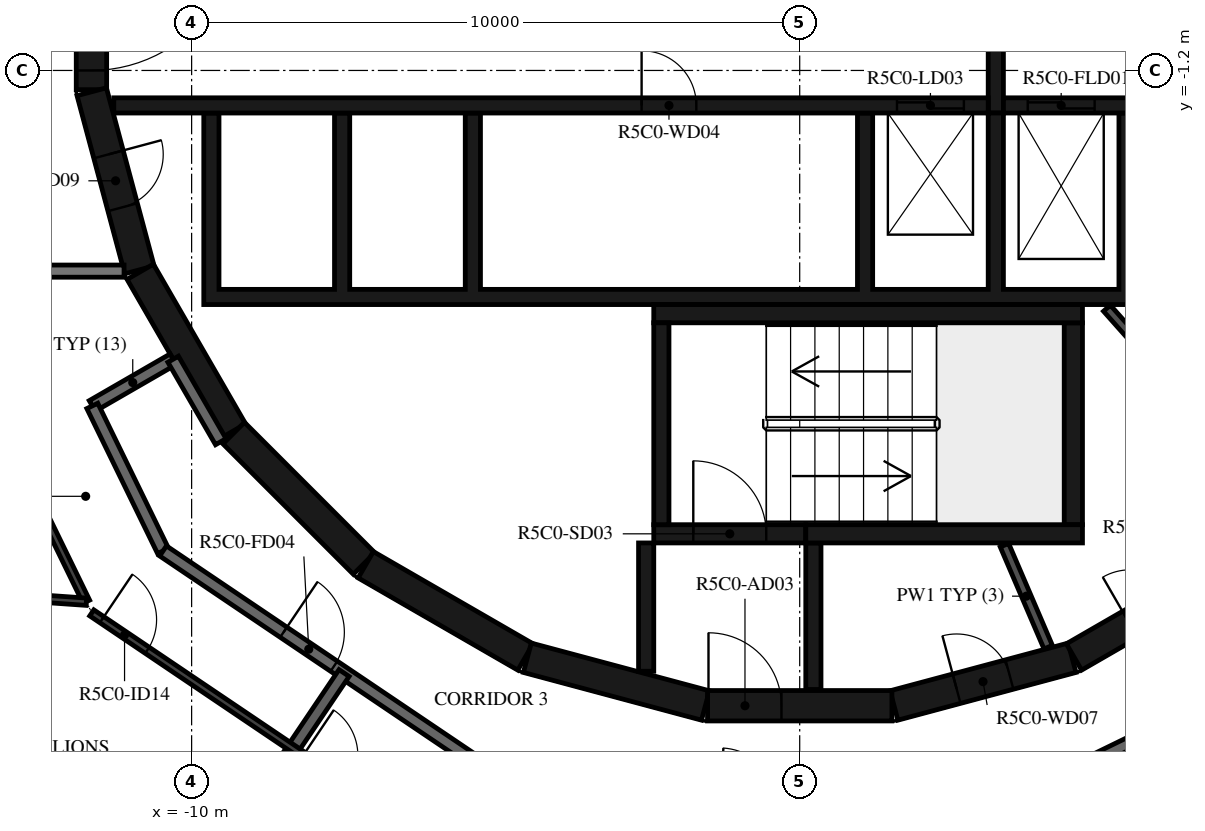
"""IFC4 building model, lengths in metres.
Left out: names, types, materials, properties, quantities, classifications, styles, units other than length and angle.
Written with IfcOpenShell. Run it as: python <this file> out.ifc"""

import sys

from ifc_helpers import new_model, si_unit, direction, frame, frame_2d, origin, place, context, subcontext, project, spatial, polyline, rectangle, outline, extrude, element, fill, save


model = new_model("IFC4")
c1 = context("Model", 3, precision=1e-05, world=origin(), true_north=direction((0.0, 1.0)))
c2 = subcontext(c1, "Body", "Model", "MODEL_VIEW")
j1 = project(units=[si_unit("LENGTHUNIT", "METRE"), si_unit("PLANEANGLEUNIT", "RADIAN")], contexts=[c1])
p1 = place(None, origin())
s1 = spatial("IfcSite", under=j1, at=p1, CompositionType="ELEMENT")
p2 = place(p1, origin())
s2 = spatial("IfcBuilding", under=s1, at=p2, CompositionType="ELEMENT")
p3 = place(p2, frame((0.0, 0.0, 209.4)))
s3 = spatial("IfcBuildingStorey", under=s2, at=p3, CompositionType="ELEMENT", Elevation=209.4)
p4 = place(p3, frame((1.55, -11.643, 0.0), z_axis=(0.0, 0.0, 1.0), x_axis=(0.965948410781, 0.258734743916, 0.0)))
e1 = element("IfcWall", 1, at=p4, inside=s3, PredefinedType="SHEAR", context=c2, shape_type="SweptSolid", body=[
    extrude(rectangle(XDim=3.033, YDim=0.5, at=frame_2d((1.516, 0.0))), origin(), (0.0, 0.0, 1.0), 3.12),
])
p5 = place(p4, frame((1.066, 0.0, 0.0)))
e2 = element("IfcOpeningElement", 2, at=p5, cuts=e1, PredefinedType="OPENING", context=c2, shape_type="SweptSolid", body=[
    extrude(rectangle(XDim=0.9, YDim=2.1, at=frame_2d((0.45, 1.05))), frame((0.0, 0.26, 0.0), z_axis=(0.0, -1.0, 0.0), x_axis=(1.0, 0.0, 0.0)), (0.0, 0.0, 1.0), 0.52),
])
p6 = place(p3, frame((4.51, -10.845, 0.0), z_axis=(0.0, 0.0, 1.0), x_axis=(0.865975092491, 0.500087131594, 0.0)))
e3 = element("IfcWall", 3, at=p6, inside=s3, PredefinedType="SHEAR", context=c2, shape_type="SweptSolid", body=[
    extrude(rectangle(XDim=3.033, YDim=0.5, at=frame_2d((1.516, 0.0))), origin(), (0.0, 0.0, 1.0), 3.12),
])
p7 = place(p6, frame((1.066, 0.0, 0.0)))
e4 = element("IfcOpeningElement", 4, at=p7, cuts=e3, PredefinedType="OPENING", context=c2, shape_type="SweptSolid", body=[
    extrude(rectangle(XDim=0.9, YDim=2.1, at=frame_2d((0.45, 1.05))), frame((0.0, 0.26, 0.0), z_axis=(0.0, -1.0, 0.0), x_axis=(1.0, 0.0, 0.0)), (0.0, 0.0, 1.0), 0.52),
])
p8 = place(p3, frame((-11.647, 1.516, 0.0), z_axis=(0.0, 0.0, 1.0), x_axis=(0.0, -1.0, 0.0)))
e5 = element("IfcWall", 5, at=p8, inside=s3, PredefinedType="SHEAR", context=c2, shape_type="SweptSolid", body=[
    extrude(rectangle(XDim=3.033, YDim=0.5, at=frame_2d((1.516, 0.0))), origin(), (0.0, 0.0, 1.0), 3.12),
])
p9 = place(p8, frame((0.316, 0.0, 0.0)))
e6 = element("IfcOpeningElement", 6, at=p9, cuts=e5, PredefinedType="OPENING", context=c2, shape_type="SweptSolid", body=[
    extrude(rectangle(XDim=2.4, YDim=2.1, at=frame_2d((1.2, 1.05))), frame((0.0, 0.26, 0.0), z_axis=(0.0, -1.0, 0.0), x_axis=(1.0, 0.0, 0.0)), (0.0, 0.0, 1.0), 0.52),
])
p10 = place(p3, frame((-11.643, -1.55, 0.0), z_axis=(0.0, 0.0, 1.0), x_axis=(0.258734743916, -0.965948410781, 0.0)))
e7 = element("IfcWall", 7, at=p10, inside=s3, PredefinedType="SHEAR", context=c2, shape_type="SweptSolid", body=[
    extrude(rectangle(XDim=3.033, YDim=0.5, at=frame_2d((1.516, 0.0))), origin(), (0.0, 0.0, 1.0), 3.12),
])
p11 = place(p10, frame((1.066, 0.0, 0.0)))
e8 = element("IfcOpeningElement", 8, at=p11, cuts=e7, PredefinedType="OPENING", context=c2, shape_type="SweptSolid", body=[
    extrude(rectangle(XDim=0.9, YDim=2.1, at=frame_2d((0.45, 1.05))), frame((0.0, 0.26, 0.0), z_axis=(0.0, -1.0, 0.0), x_axis=(1.0, 0.0, 0.0)), (0.0, 0.0, 1.0), 0.52),
])
p12 = place(p3, frame((-10.845, -4.51, 0.0), z_axis=(0.0, 0.0, 1.0), x_axis=(0.500087131594, -0.865975092491, 0.0)))
e9 = element("IfcWall", 9, at=p12, inside=s3, PredefinedType="SHEAR", context=c2, shape_type="SweptSolid", body=[
    extrude(rectangle(XDim=3.033, YDim=0.5, at=frame_2d((1.516, 0.0))), origin(), (0.0, 0.0, 1.0), 3.12),
])
p13 = place(p3, frame((-9.308, -7.164, 0.0), z_axis=(0.0, 0.0, 1.0), x_axis=(0.707106781187, -0.707106781187, 0.0)))
e10 = element("IfcWall", 10, at=p13, inside=s3, PredefinedType="SHEAR", context=c2, shape_type="SweptSolid", body=[
    extrude(rectangle(XDim=3.032, YDim=0.5, at=frame_2d((1.516, 0.0))), origin(), (0.0, 0.0, 1.0), 3.12),
])
for number, where, z_axis, x_axis in (
    (11, (-7.137, -9.329, 0.0), (0.0, 0.0, 1.0), (0.866, -0.5, 0.0)),
    (12, (-4.479, -10.858, 0.0), (0.0, 0.0, 1.0), (0.966, -0.259, 0.0)),
):
    element("IfcWall", number, at=place(p3, frame(where, z_axis=z_axis, x_axis=x_axis)), inside=s3, PredefinedType="SHEAR", context=c2, shape_type="SweptSolid", body=[
        extrude(rectangle(XDim=3.033, YDim=0.5, at=frame_2d((1.516, 0.0))), origin(), (0.0, 0.0, 1.0), 3.12),
    ])
p14 = place(p3, frame((-1.516, -11.647, 0.0), z_axis=(0.0, 0.0, 1.0), x_axis=(1.0, 0.0, 0.0)))
e13 = element("IfcWall", 13, at=p14, inside=s3, PredefinedType="SHEAR", context=c2, shape_type="SweptSolid", body=[
    extrude(rectangle(XDim=3.033, YDim=0.5, at=frame_2d((1.516, 0.0))), origin(), (0.0, 0.0, 1.0), 3.12),
])
p15 = place(p14, frame((0.016, 0.0, 0.0)))
e14 = element("IfcOpeningElement", 14, at=p15, cuts=e13, PredefinedType="OPENING", context=c2, shape_type="SweptSolid", body=[
    extrude(rectangle(XDim=1.2, YDim=2.1, at=frame_2d((0.6, 1.05))), frame((0.0, 0.26, 0.0), z_axis=(0.0, -1.0, 0.0), x_axis=(1.0, 0.0, 0.0)), (0.0, 0.0, 1.0), 0.52),
])
p16 = place(p3, frame((-2.275, -8.67, 0.0), z_axis=(0.0, 0.0, 1.0), x_axis=(0.0, 1.0, 0.0)))
e15 = element("IfcWall", 15, at=p16, inside=s3, PredefinedType="SHEAR", context=c2, shape_type="SweptSolid", body=[
    extrude(rectangle(XDim=3.32, YDim=0.25, at=frame_2d((1.66, 0.0))), origin(), (0.0, 0.0, 1.0), 3.12),
])
p17 = place(p3, frame((-2.4, -5.2, 0.0), z_axis=(0.0, 0.0, 1.0), x_axis=(1.0, 0.0, 0.0)))
e16 = element("IfcWall", 16, at=p17, inside=s3, PredefinedType="SHEAR", context=c2, shape_type="SweptSolid", body=[
    extrude(rectangle(XDim=7.05, YDim=0.3, at=frame_2d((3.525, 0.0))), origin(), (0.0, 0.0, 1.0), 3.12),
])
p18 = place(p3, frame((4.5, -8.67, 0.0), z_axis=(0.0, 0.0, 1.0), x_axis=(0.0, 1.0, 0.0)))
e17 = element("IfcWall", 17, at=p18, inside=s3, PredefinedType="SHEAR", context=c2, shape_type="SweptSolid", body=[
    extrude(rectangle(XDim=3.32, YDim=0.3, at=frame_2d((1.66, 0.0))), origin(), (0.0, 0.0, 1.0), 3.12),
])
p19 = place(p3, frame((0.1, -8.82, 0.0), z_axis=(0.0, 0.0, 1.0), x_axis=(1.0, 0.0, 0.0)))
e18 = element("IfcWall", 18, at=p19, inside=s3, PredefinedType="SHEAR", context=c2, shape_type="SweptSolid", body=[
    extrude(rectangle(XDim=4.55, YDim=0.3, at=frame_2d((2.275, 0.0))), origin(), (0.0, 0.0, 1.0), 3.12),
])
p20 = place(p3, frame((-2.4, -8.82, 0.0), z_axis=(0.0, 0.0, 1.0), x_axis=(1.0, 0.0, 0.0)))
e19 = element("IfcWall", 19, at=p20, inside=s3, PredefinedType="SHEAR", context=c2, shape_type="SweptSolid", body=[
    extrude(rectangle(XDim=2.5, YDim=0.3, at=frame_2d((1.25, 0.0))), origin(), (0.0, 0.0, 1.0), 3.12),
])
p21 = place(p20, frame((0.65, 0.0, 0.0)))
e20 = element("IfcOpeningElement", 20, at=p21, cuts=e19, PredefinedType="OPENING", context=c2, shape_type="SweptSolid", body=[
    extrude(rectangle(XDim=1.2, YDim=2.1, at=frame_2d((0.6, 1.05))), frame((0.0, 0.16, 0.0), z_axis=(0.0, -1.0, 0.0), x_axis=(1.0, 0.0, 0.0)), (0.0, 0.0, 1.0), 0.32),
])
p22 = place(p3, frame((-2.525, -8.97, 0.0), z_axis=(0.0, 0.0, 1.0), x_axis=(0.0, -1.0, 0.0)))
e21 = element("IfcWall", 21, at=p22, inside=s3, PredefinedType="SHEAR", context=c2, shape_type="SweptSolid", body=[
    extrude(rectangle(XDim=2.11, YDim=0.25, at=frame_2d((1.055, 0.0))), origin(), (0.0, 0.0, 1.0), 3.12),
])
p23 = place(p3, frame((0.225, -8.97, 0.0), z_axis=(0.0, 0.0, 1.0), x_axis=(0.0, -1.0, 0.0)))
e22 = element("IfcWall", 22, at=p23, inside=s3, PredefinedType="SHEAR", context=c2, shape_type="SweptSolid", body=[
    extrude(rectangle(XDim=2.41, YDim=0.25, at=frame_2d((1.205, 0.0))), origin(), (0.0, 0.0, 1.0), 3.12),
])
p24 = place(p3, origin())
e23 = element("IfcWall", 23, at=p24, inside=s3, PredefinedType="SHEAR", context=c2, shape_type="SweptSolid", body=[
    extrude(outline(polyline([(9.8, -5.05), (9.8, -4.8), (9.8, -1.9), (9.55, -1.9), (9.55, -4.8), (7.65, -4.8), (7.65, -1.9), (7.4, -1.9), (7.4, -4.8), (5.5, -4.8), (5.5, -1.9), (5.25, -1.9), (5.25, -4.8), (3.35, -4.8), (3.35, -1.9), (3.1, -1.9), (3.1, -4.8), (1.2, -4.8), (1.2, -1.9), (0.95, -1.9), (0.95, -4.8), (-5.25, -4.8), (-5.25, -1.9), (-5.5, -1.9), (-5.5, -4.8), (-7.4, -4.8), (-7.4, -1.9), (-7.65, -1.9), (-7.65, -4.8), (-9.55, -4.8), (-9.55, -1.9), (-9.8, -1.9), (-9.8, -4.8), (-9.8, -5.05), (9.8, -5.05)])), origin(), (0.0, 0.0, 1.0), 3.12),
])
p25 = place(p3, frame((-11.28, -1.775, 0.0), z_axis=(0.0, 0.0, 1.0), x_axis=(1.0, 0.0, 0.0)))
e24 = element("IfcWall", 24, at=p25, inside=s3, PredefinedType="SHEAR", context=c2, shape_type="SweptSolid", body=[
    extrude(rectangle(XDim=14.38, YDim=0.25, at=frame_2d((7.19, 0.0))), origin(), (0.0, 0.0, 1.0), 3.12),
])
p26 = place(p25, frame((12.88, 0.0, 0.0)))
e25 = element("IfcOpeningElement", 25, at=p26, cuts=e24, PredefinedType="OPENING", context=c2, shape_type="SweptSolid", body=[
    extrude(rectangle(XDim=1.1, YDim=2.1, at=frame_2d((0.55, 1.05))), frame((0.0, 0.135, 0.0), z_axis=(0.0, -1.0, 0.0), x_axis=(1.0, 0.0, 0.0)), (0.0, 0.0, 1.0), 0.27),
])
p27 = place(p25, frame((8.68, 0.0, 0.0)))
e26 = element("IfcOpeningElement", 26, at=p27, cuts=e24, PredefinedType="OPENING", context=c2, shape_type="SweptSolid", body=[
    extrude(rectangle(XDim=0.9, YDim=2.1, at=frame_2d((0.45, 1.05))), frame((0.0, 0.135, 0.0), z_axis=(0.0, -1.0, 0.0), x_axis=(1.0, 0.0, 0.0)), (0.0, 0.0, 1.0), 0.27),
])
p28 = place(p3, frame((3.35, -1.775, 0.0), z_axis=(0.0, 0.0, 1.0), x_axis=(1.0, 0.0, 0.0)))
e27 = element("IfcWall", 27, at=p28, inside=s3, PredefinedType="SHEAR", context=c2, shape_type="SweptSolid", body=[
    extrude(rectangle(XDim=7.93, YDim=0.25, at=frame_2d((3.965, 0.0))), origin(), (0.0, 0.0, 1.0), 3.12),
])
p29 = place(p28, frame((0.4, 0.0, 0.0)))
e28 = element("IfcOpeningElement", 28, at=p29, cuts=e27, PredefinedType="OPENING", context=c2, shape_type="SweptSolid", body=[
    extrude(rectangle(XDim=1.1, YDim=2.4, at=frame_2d((0.55, 1.2))), frame((0.0, 0.135, 0.0), z_axis=(0.0, -1.0, 0.0), x_axis=(1.0, 0.0, 0.0)), (0.0, 0.0, 1.0), 0.27),
])
p30 = place(p28, frame((2.55, 0.0, 0.0)))
e29 = element("IfcOpeningElement", 29, at=p30, cuts=e27, PredefinedType="OPENING", context=c2, shape_type="SweptSolid", body=[
    extrude(rectangle(XDim=1.1, YDim=2.4, at=frame_2d((0.55, 1.2))), frame((0.0, 0.135, 0.0), z_axis=(0.0, -1.0, 0.0), x_axis=(1.0, 0.0, 0.0)), (0.0, 0.0, 1.0), 0.27),
])
p31 = place(p28, frame((4.7, 0.0, 0.0)))
e30 = element("IfcOpeningElement", 30, at=p31, cuts=e27, PredefinedType="OPENING", context=c2, shape_type="SweptSolid", body=[
    extrude(rectangle(XDim=1.1, YDim=2.4, at=frame_2d((0.55, 1.2))), frame((0.0, 0.135, 0.0), z_axis=(0.0, -1.0, 0.0), x_axis=(1.0, 0.0, 0.0)), (0.0, 0.0, 1.0), 0.27),
])
p32 = place(p3, frame((3.225, -1.9, 0.0), z_axis=(0.0, 0.0, 1.0), x_axis=(0.0, 1.0, 0.0)))
e31 = element("IfcWall", 31, at=p32, inside=s3, PredefinedType="SHEAR", context=c2, shape_type="SweptSolid", body=[
    extrude(rectangle(XDim=3.8, YDim=0.25, at=frame_2d((1.9, 0.0))), origin(), (0.0, 0.0, 1.0), 3.12),
])
p33 = place(p3, frame((7.842, -8.248, 0.0), z_axis=(0.0, 0.0, 1.0), x_axis=(-0.66446128181, 0.747322691329, 0.0)))
e32 = element("IfcWall", 32, at=p33, inside=s3, PredefinedType="PARTITIONING", context=c2, shape_type="SweptSolid", body=[
    extrude(rectangle(XDim=4.198, YDim=0.15, at=frame_2d((2.099, 0.0))), origin(), (0.0, 0.0, 1.0), 3.12),
])
p34 = place(p3, frame((3.367, -9.007, 0.0), z_axis=(0.0, 0.0, 1.0), x_axis=(0.394387482265, -0.918944238696, 0.0)))
e33 = element("IfcWall", 33, at=p34, inside=s3, PredefinedType="PARTITIONING", context=c2, shape_type="SweptSolid", body=[
    extrude(rectangle(XDim=1.825, YDim=0.15, at=frame_2d((0.913, 0.0))), origin(), (0.0, 0.0, 1.0), 3.12),
])
p35 = place(p3, frame((-10.303, -5.949, 0.0), z_axis=(0.0, 0.0, 1.0), x_axis=(-0.866042588199, -0.499970234539, 0.0)))
e34 = element("IfcWall", 34, at=p35, inside=s3, PredefinedType="STANDARD", context=c2, shape_type="SweptSolid", body=[
    extrude(rectangle(XDim=1.535, YDim=0.2, at=frame_2d((0.768, 0.0))), origin(), (0.0, 0.0, 1.0), 3.12),
])
p36 = place(p3, frame((-11.633, -6.716, 0.0), z_axis=(0.0, 0.0, 1.0), x_axis=(0.438322116278, -0.898817958422, 0.0)))
e35 = element("IfcWall", 35, at=p36, inside=s3, PredefinedType="STANDARD", context=c2, shape_type="SweptSolid", body=[
    extrude(rectangle(XDim=2.654, YDim=0.2, at=frame_2d((1.327, 0.0))), origin(), (0.0, 0.0, 1.0), 3.12),
])
p37 = place(p3, frame((-10.47, -9.101, 0.0), z_axis=(0.0, 0.0, 1.0), x_axis=(0.829035841718, -0.559195469534, 0.0)))
e36 = element("IfcWall", 36, at=p37, inside=s3, PredefinedType="STANDARD", context=c2, shape_type="SweptSolid", body=[
    extrude(rectangle(XDim=7.181, YDim=0.2, at=frame_2d((3.591, 0.0))), origin(), (0.0, 0.0, 1.0), 3.12),
])
p38 = place(p37, frame((2.39, 0.0, 0.0)))
e37 = element("IfcOpeningElement", 37, at=p38, cuts=e36, PredefinedType="OPENING", context=c2, shape_type="SweptSolid", body=[
    extrude(rectangle(XDim=1.0, YDim=2.1, at=frame_2d((0.5, 1.05))), frame((0.0, 0.11, 0.0), z_axis=(0.0, -1.0, 0.0), x_axis=(1.0, 0.0, 0.0)), (0.0, 0.0, 1.0), 0.22),
])
p39 = place(p3, frame((-9.52, -7.305, 0.0), z_axis=(0.0, 0.0, 1.0), x_axis=(-0.500028278809, 0.866009076391, 0.0)))
e38 = element("IfcWall", 38, at=p39, inside=s3, PredefinedType="STANDARD", context=c2, shape_type="SweptSolid", body=[
    extrude(rectangle(XDim=1.566, YDim=0.2, at=frame_2d((0.783, 0.0))), origin(), (0.0, 0.0, 1.0), 3.12),
])
p40 = place(p3, frame((2.647, -13.618, 0.0), z_axis=(0.0, 0.0, 1.0), x_axis=(0.898796543751, 0.438366026218, 0.0)))
e39 = element("IfcWall", 39, at=p40, inside=s3, PredefinedType="STANDARD", context=c2, shape_type="SweptSolid", body=[
    extrude(rectangle(XDim=7.181, YDim=0.2, at=frame_2d((3.591, 0.0))), origin(), (0.0, 0.0, 1.0), 3.12),
])
p41 = place(p40, frame((0.2, 0.0, 0.0)))
e40 = element("IfcOpeningElement", 40, at=p41, cuts=e39, PredefinedType="OPENING", context=c2, shape_type="SweptSolid", body=[
    extrude(rectangle(XDim=1.0, YDim=2.1, at=frame_2d((0.5, 1.05))), frame((0.0, 0.11, 0.0), z_axis=(0.0, -1.0, 0.0), x_axis=(1.0, 0.0, 0.0)), (0.0, 0.0, 1.0), 0.22),
])
p42 = place(p3, frame((-18.55, -4.5, 0.0), z_axis=(0.0, 0.0, 1.0), x_axis=(1.0, 0.0, 0.0)))
e41 = element("IfcWall", 41, at=p42, inside=s3, PredefinedType="STANDARD", context=c2, shape_type="SweptSolid", body=[
    extrude(rectangle(XDim=7.438, YDim=0.2, at=frame_2d((3.719, 0.0))), origin(), (0.0, 0.0, 1.0), 3.12),
])
p43 = place(p3, frame((-10.408, -15.43, 0.0), z_axis=(0.0, 0.0, 1.0), x_axis=(0.559199317758, 0.829033246027, 0.0)))
e42 = element("IfcWall", 42, at=p43, inside=s3, PredefinedType="STANDARD", context=c2, shape_type="SweptSolid", body=[
    extrude(rectangle(XDim=5.212, YDim=0.2, at=frame_2d((2.606, 0.0))), origin(), (0.0, 0.0, 1.0), 3.12),
])
p44 = place(p3, frame((-14.383, -4.5, 0.0), z_axis=(0.0, 0.0, 1.0), x_axis=(0.438393414895, -0.898783185077, 0.0)))
e43 = element("IfcWall", 43, at=p44, inside=s3, PredefinedType="PARTITIONING", context=c2, shape_type="SweptSolid", body=[
    extrude(rectangle(XDim=6.049, YDim=0.12, at=frame_2d((3.024, 0.0))), origin(), (0.0, 0.0, 1.0), 3.12),
])
p45 = place(p44, frame((0.4, 0.0, 0.0)))
e44 = element("IfcOpeningElement", 44, at=p45, cuts=e43, PredefinedType="OPENING", context=c2, shape_type="SweptSolid", body=[
    extrude(rectangle(XDim=0.8, YDim=2.1, at=frame_2d((0.4, 1.05))), frame((0.0, 0.07, 0.0), z_axis=(0.0, -1.0, 0.0), x_axis=(1.0, 0.0, 0.0)), (0.0, 0.0, 1.0), 0.14),
])
p46 = place(p3, frame((-11.642, -10.12, 0.0), z_axis=(0.0, 0.0, 1.0), x_axis=(0.829029427133, -0.559204979365, 0.0)))
e45 = element("IfcWall", 45, at=p46, inside=s3, PredefinedType="PARTITIONING", context=c2, shape_type="SweptSolid", body=[
    extrude(rectangle(XDim=6.904, YDim=0.12, at=frame_2d((3.452, 0.0))), origin(), (0.0, 0.0, 1.0), 3.12),
])
p47 = place(p46, frame((0.2, 0.0, 0.0)))
e46 = element("IfcOpeningElement", 46, at=p47, cuts=e45, PredefinedType="OPENING", context=c2, shape_type="SweptSolid", body=[
    extrude(rectangle(XDim=0.9, YDim=2.1, at=frame_2d((0.45, 1.05))), frame((0.0, 0.07, 0.0), z_axis=(0.0, -1.0, 0.0), x_axis=(1.0, 0.0, 0.0)), (0.0, 0.0, 1.0), 0.14),
])
p48 = place(p46, frame((4.192, 0.0, 0.0)))
e47 = element("IfcOpeningElement", 47, at=p48, cuts=e45, PredefinedType="OPENING", context=c2, shape_type="SweptSolid", body=[
    extrude(rectangle(XDim=0.9, YDim=2.1, at=frame_2d((0.45, 1.05))), frame((0.0, 0.07, 0.0), z_axis=(0.0, -1.0, 0.0), x_axis=(1.0, 0.0, 0.0)), (0.0, 0.0, 1.0), 0.14),
])
p49 = place(p3, frame((-15.294, -9.688, 0.0), z_axis=(0.0, 0.0, 1.0), x_axis=(0.997565819809, -0.069731163391, 0.0)))
e48 = element("IfcWall", 48, at=p49, inside=s3, PredefinedType="PARTITIONING", context=c2, shape_type="SweptSolid", body=[
    extrude(rectangle(XDim=3.571, YDim=0.12, at=frame_2d((1.786, 0.0))), origin(), (0.0, 0.0, 1.0), 3.12),
])
p50 = place(p3, frame((3.074, -15.078, 0.0), z_axis=(0.0, 0.0, 1.0), x_axis=(0.898800770739, 0.438357359377, 0.0)))
e49 = element("IfcWall", 49, at=p50, inside=s3, PredefinedType="PARTITIONING", context=c2, shape_type="SweptSolid", body=[
    extrude(rectangle(XDim=7.694, YDim=0.12, at=frame_2d((3.847, 0.0))), origin(), (0.0, 0.0, 1.0), 3.12),
])
p51 = place(p50, frame((0.2, 0.0, 0.0)))
e50 = element("IfcOpeningElement", 50, at=p51, cuts=e49, PredefinedType="OPENING", context=c2, shape_type="SweptSolid", body=[
    extrude(rectangle(XDim=0.9, YDim=2.1, at=frame_2d((0.45, 1.05))), frame((0.0, 0.07, 0.0), z_axis=(0.0, -1.0, 0.0), x_axis=(1.0, 0.0, 0.0)), (0.0, 0.0, 1.0), 0.14),
])
p52 = place(p21, origin())
e51 = element("IfcDoor", 51, at=p52, inside=s3, OperationType="SINGLE_SWING_LEFT", PredefinedType="DOOR", context=c2, shape_type="SweptSolid", body=[
    extrude(rectangle(XDim=1.2, YDim=2.1, at=frame_2d((0.6, 1.05))), frame((0.0, 0.025, 0.0), z_axis=(0.0, -1.0, 0.0), x_axis=(1.0, 0.0, 0.0)), (0.0, 0.0, 1.0), 0.05),
])
fill(e20, e51)
p53 = place(p15, origin())
e52 = element("IfcDoor", 52, at=p53, inside=s3, OperationType="SINGLE_SWING_RIGHT", PredefinedType="DOOR", context=c2, shape_type="SweptSolid", body=[
    extrude(rectangle(XDim=1.2, YDim=2.1, at=frame_2d((0.6, 1.05))), frame((0.0, 0.025, 0.0), z_axis=(0.0, -1.0, 0.0), x_axis=(1.0, 0.0, 0.0)), (0.0, 0.0, 1.0), 0.05),
])
fill(e14, e52)
p54 = place(p9, origin())
e53 = element("IfcDoor", 53, at=p54, inside=s3, OperationType="DOUBLE_DOOR_SINGLE_SWING", PredefinedType="DOOR", context=c2, shape_type="SweptSolid", body=[
    extrude(rectangle(XDim=2.4, YDim=2.1, at=frame_2d((1.2, 1.05))), frame((0.0, 0.025, 0.0), z_axis=(0.0, -1.0, 0.0), x_axis=(1.0, 0.0, 0.0)), (0.0, 0.0, 1.0), 0.05),
])
fill(e6, e53)
p55 = place(p26, origin())
e54 = element("IfcDoor", 54, at=p55, inside=s3, OperationType="DOUBLE_DOOR_SLIDING", PredefinedType="DOOR", context=c2, shape_type="SweptSolid", body=[
    extrude(rectangle(XDim=1.1, YDim=2.1, at=frame_2d((0.55, 1.05))), frame((0.0, 0.025, 0.0), z_axis=(0.0, -1.0, 0.0), x_axis=(1.0, 0.0, 0.0)), (0.0, 0.0, 1.0), 0.05),
])
fill(e25, e54)
p56 = place(p29, origin())
e55 = element("IfcDoor", 55, at=p56, inside=s3, OperationType="DOUBLE_DOOR_SLIDING", PredefinedType="DOOR", context=c2, shape_type="SweptSolid", body=[
    extrude(rectangle(XDim=1.1, YDim=2.4, at=frame_2d((0.55, 1.2))), frame((0.0, 0.025, 0.0), z_axis=(0.0, -1.0, 0.0), x_axis=(1.0, 0.0, 0.0)), (0.0, 0.0, 1.0), 0.05),
])
fill(e28, e55)
p57 = place(p27, origin())
e56 = element("IfcDoor", 56, at=p57, inside=s3, OperationType="SINGLE_SWING_RIGHT", PredefinedType="DOOR", context=c2, shape_type="SweptSolid", body=[
    extrude(rectangle(XDim=0.9, YDim=2.1, at=frame_2d((0.45, 1.05))), frame((0.0, 0.025, 0.0), z_axis=(0.0, -1.0, 0.0), x_axis=(1.0, 0.0, 0.0)), (0.0, 0.0, 1.0), 0.05),
])
fill(e26, e56)
p58 = place(p5, origin())
e57 = element("IfcDoor", 57, at=p58, inside=s3, OperationType="SINGLE_SWING_LEFT", PredefinedType="DOOR", context=c2, shape_type="SweptSolid", body=[
    extrude(rectangle(XDim=0.9, YDim=2.1, at=frame_2d((0.45, 1.05))), frame((0.0, 0.025, 0.0), z_axis=(0.0, -1.0, 0.0), x_axis=(1.0, 0.0, 0.0)), (0.0, 0.0, 1.0), 0.05),
])
fill(e2, e57)
p59 = place(p11, origin())
e58 = element("IfcDoor", 58, at=p59, inside=s3, OperationType="SINGLE_SWING_LEFT", PredefinedType="DOOR", context=c2, shape_type="SweptSolid", body=[
    extrude(rectangle(XDim=0.9, YDim=2.1, at=frame_2d((0.45, 1.05))), frame((0.0, 0.025, 0.0), z_axis=(0.0, -1.0, 0.0), x_axis=(1.0, 0.0, 0.0)), (0.0, 0.0, 1.0), 0.05),
])
fill(e8, e58)
p60 = place(p38, origin())
e59 = element("IfcDoor", 59, at=p60, inside=s3, OperationType="SINGLE_SWING_RIGHT", PredefinedType="DOOR", context=c2, shape_type="SweptSolid", body=[
    extrude(rectangle(XDim=1.0, YDim=2.1, at=frame_2d((0.5, 1.05))), frame((0.0, 0.025, 0.0), z_axis=(0.0, -1.0, 0.0), x_axis=(1.0, 0.0, 0.0)), (0.0, 0.0, 1.0), 0.05),
])
fill(e37, e59)
p61 = place(p47, origin())
e60 = element("IfcDoor", 60, at=p61, inside=s3, OperationType="SINGLE_SWING_RIGHT", PredefinedType="DOOR", context=c2, shape_type="SweptSolid", body=[
    extrude(rectangle(XDim=0.9, YDim=2.1, at=frame_2d((0.45, 1.05))), frame((0.0, 0.025, 0.0), z_axis=(0.0, -1.0, 0.0), x_axis=(1.0, 0.0, 0.0)), (0.0, 0.0, 1.0), 0.05),
])
fill(e46, e60)
save(model, sys.argv[1])
